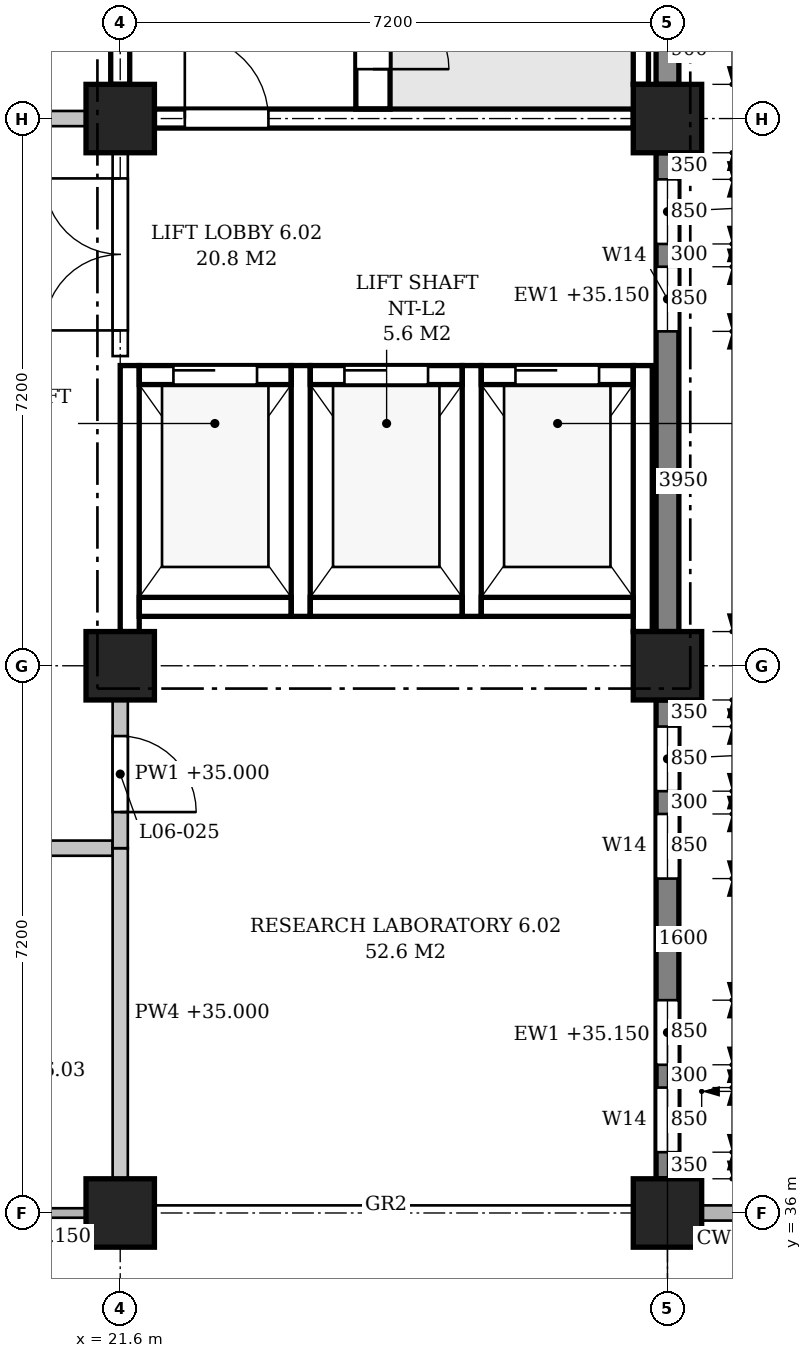
"""IFC4 building model, lengths in metres.
Left out: names, types, materials, properties, quantities, classifications, styles, units other than length and angle.
Written with IfcOpenShell. Run it as: python <this file> out.ifc"""

import sys

from ifc_helpers import new_model, si_unit, direction, frame, frame_2d, origin, origin_2d, place, context, subcontext, project, spatial, polyline, rectangle, outline, extrude, element, fill, save


model = new_model("IFC4")
c1 = context("Model", 3, precision=1e-05, world=origin(), true_north=direction((0.0, 1.0)))
c2 = subcontext(c1, "Body", "Model", "MODEL_VIEW")
j1 = project(units=[si_unit("LENGTHUNIT", "METRE"), si_unit("PLANEANGLEUNIT", "RADIAN")], contexts=[c1])
p1 = place(None, origin())
s1 = spatial("IfcSite", under=j1, at=p1, CompositionType="ELEMENT")
p2 = place(p1, origin())
s2 = spatial("IfcBuilding", under=s1, at=p2, CompositionType="ELEMENT")
p3 = place(p2, frame((0.0, 0.0, 31.2)))
s3 = spatial("IfcBuildingStorey", under=s2, at=p3, CompositionType="ELEMENT", Elevation=31.2)
for number, where, z_axis, x_axis in (
    (1, (21.6, 36.0, 0.0), (0.0, 0.0, 1.0), (1.0, 0.0, 0.0)),
    (2, (21.6, 43.2, 0.0), (0.0, 0.0, 1.0), (1.0, 0.0, 0.0)),
    (3, (21.6, 50.4, 0.0), (0.0, 0.0, 1.0), (1.0, 0.0, 0.0)),
    (4, (28.8, 36.0, 0.0), (0.0, 0.0, 1.0), (1.0, 0.0, 0.0)),
    (5, (28.8, 43.2, 0.0), (0.0, 0.0, 1.0), (1.0, 0.0, 0.0)),
    (6, (28.8, 50.4, 0.0), (0.0, 0.0, 1.0), (1.0, 0.0, 0.0)),
):
    element("IfcColumn", number, at=place(p3, frame(where, z_axis=z_axis, x_axis=x_axis)), inside=s3, PredefinedType="COLUMN", context=c2, shape_type="SweptSolid", body=[
        extrude(rectangle(XDim=0.9, YDim=0.9, at=origin_2d()), origin(), (0.0, 0.0, 1.0), 4.8),
    ])
p4 = place(p3, frame((28.8, 36.45, 0.0), z_axis=(0.0, 0.0, 1.0), x_axis=(0.0, 1.0, 0.0)))
e7 = element("IfcWall", 7, at=p4, inside=s3, PredefinedType="STANDARD", context=c2, shape_type="SweptSolid", body=[
    extrude(rectangle(XDim=6.3, YDim=0.3, at=frame_2d((3.15, 0.0))), origin(), (0.0, 0.0, 1.0), 3.95),
])
p5 = place(p4, frame((0.35, 0.0, 0.9)))
e8 = element("IfcOpeningElement", 8, at=p5, cuts=e7, PredefinedType="OPENING", context=c2, shape_type="SweptSolid", body=[
    extrude(outline(polyline([(0.0, 0.0), (0.85, 0.0), (0.85, 2.05), (0.425, 2.5), (0.0, 2.05), (0.0, 0.0)])), frame((0.0, 0.16, 0.0), z_axis=(0.0, -1.0, 0.0), x_axis=(1.0, 0.0, 0.0)), (0.0, 0.0, 1.0), 0.32),
])
p6 = place(p4, frame((1.5, 0.0, 0.9)))
e9 = element("IfcOpeningElement", 9, at=p6, cuts=e7, PredefinedType="OPENING", context=c2, shape_type="SweptSolid", body=[
    extrude(outline(polyline([(0.0, 0.0), (0.85, 0.0), (0.85, 2.05), (0.425, 2.5), (0.0, 2.05), (0.0, 0.0)])), frame((0.0, 0.16, 0.0), z_axis=(0.0, -1.0, 0.0), x_axis=(1.0, 0.0, 0.0)), (0.0, 0.0, 1.0), 0.32),
])
p7 = place(p4, frame((3.95, 0.0, 0.9)))
e10 = element("IfcOpeningElement", 10, at=p7, cuts=e7, PredefinedType="OPENING", context=c2, shape_type="SweptSolid", body=[
    extrude(outline(polyline([(0.0, 0.0), (0.85, 0.0), (0.85, 2.05), (0.425, 2.5), (0.0, 2.05), (0.0, 0.0)])), frame((0.0, 0.16, 0.0), z_axis=(0.0, -1.0, 0.0), x_axis=(1.0, 0.0, 0.0)), (0.0, 0.0, 1.0), 0.32),
])
p8 = place(p4, frame((5.1, 0.0, 0.9)))
e11 = element("IfcOpeningElement", 11, at=p8, cuts=e7, PredefinedType="OPENING", context=c2, shape_type="SweptSolid", body=[
    extrude(outline(polyline([(0.0, 0.0), (0.85, 0.0), (0.85, 2.05), (0.425, 2.5), (0.0, 2.05), (0.0, 0.0)])), frame((0.0, 0.16, 0.0), z_axis=(0.0, -1.0, 0.0), x_axis=(1.0, 0.0, 0.0)), (0.0, 0.0, 1.0), 0.32),
])
p9 = place(p3, frame((28.8, 43.65, 0.0), z_axis=(0.0, 0.0, 1.0), x_axis=(0.0, 1.0, 0.0)))
e12 = element("IfcWall", 12, at=p9, inside=s3, PredefinedType="STANDARD", context=c2, shape_type="SweptSolid", body=[
    extrude(rectangle(XDim=6.3, YDim=0.3, at=frame_2d((3.15, 0.0))), origin(), (0.0, 0.0, 1.0), 3.95),
])
p10 = place(p9, frame((3.95, 0.0, 0.9)))
e13 = element("IfcOpeningElement", 13, at=p10, cuts=e12, PredefinedType="OPENING", context=c2, shape_type="SweptSolid", body=[
    extrude(outline(polyline([(0.0, 0.0), (0.85, 0.0), (0.85, 2.05), (0.425, 2.5), (0.0, 2.05), (0.0, 0.0)])), frame((0.0, 0.16, 0.0), z_axis=(0.0, -1.0, 0.0), x_axis=(1.0, 0.0, 0.0)), (0.0, 0.0, 1.0), 0.32),
])
p11 = place(p9, frame((5.1, 0.0, 0.9)))
e14 = element("IfcOpeningElement", 14, at=p11, cuts=e12, PredefinedType="OPENING", context=c2, shape_type="SweptSolid", body=[
    extrude(outline(polyline([(0.0, 0.0), (0.85, 0.0), (0.85, 2.05), (0.425, 2.5), (0.0, 2.05), (0.0, 0.0)])), frame((0.0, 0.16, 0.0), z_axis=(0.0, -1.0, 0.0), x_axis=(1.0, 0.0, 0.0)), (0.0, 0.0, 1.0), 0.32),
])
p12 = place(p3, frame((28.8, 50.85, 0.0), z_axis=(0.0, 0.0, 1.0), x_axis=(0.0, 1.0, 0.0)))
e15 = element("IfcWall", 15, at=p12, inside=s3, PredefinedType="STANDARD", context=c2, shape_type="SweptSolid", body=[
    extrude(rectangle(XDim=6.3, YDim=0.3, at=frame_2d((3.15, 0.0))), origin(), (0.0, 0.0, 1.0), 3.95),
])
p13 = place(p12, frame((0.9, 0.0, 0.9)))
e16 = element("IfcOpeningElement", 16, at=p13, cuts=e15, PredefinedType="OPENING", context=c2, shape_type="SweptSolid", body=[
    extrude(outline(polyline([(0.0, 0.0), (0.9, 0.0), (0.9, 2.05), (0.45, 2.5), (0.0, 2.05), (0.0, 0.0)])), frame((0.0, 0.16, 0.0), z_axis=(0.0, -1.0, 0.0), x_axis=(1.0, 0.0, 0.0)), (0.0, 0.0, 1.0), 0.32),
])
p14 = place(p12, frame((4.5, 0.0, 0.9)))
e17 = element("IfcOpeningElement", 17, at=p14, cuts=e15, PredefinedType="OPENING", context=c2, shape_type="SweptSolid", body=[
    extrude(outline(polyline([(0.0, 0.0), (0.9, 0.0), (0.9, 2.05), (0.45, 2.5), (0.0, 2.05), (0.0, 0.0)])), frame((0.0, 0.16, 0.0), z_axis=(0.0, -1.0, 0.0), x_axis=(1.0, 0.0, 0.0)), (0.0, 0.0, 1.0), 0.32),
])
p15 = place(p3, frame((22.05, 50.4, 0.0), z_axis=(0.0, 0.0, 1.0), x_axis=(1.0, 0.0, 0.0)))
e18 = element("IfcWall", 18, at=p15, inside=s3, PredefinedType="SHEAR", context=c2, shape_type="SweptSolid", body=[
    extrude(rectangle(XDim=6.3, YDim=0.25, at=frame_2d((3.15, 0.0))), origin(), (0.0, 0.0, 1.0), 3.8),
])
p16 = place(p15, frame((0.4, 0.0, 0.0)))
e19 = element("IfcOpeningElement", 19, at=p16, cuts=e18, PredefinedType="OPENING", context=c2, shape_type="SweptSolid", body=[
    extrude(rectangle(XDim=1.1, YDim=2.1, at=frame_2d((0.55, 1.05))), frame((0.0, 0.135, 0.0), z_axis=(0.0, -1.0, 0.0), x_axis=(1.0, 0.0, 0.0)), (0.0, 0.0, 1.0), 0.27),
])
p17 = place(p3, frame((21.6, 50.85, 0.0), z_axis=(0.0, 0.0, 1.0), x_axis=(0.0, 1.0, 0.0)))
e20 = element("IfcWall", 20, at=p17, inside=s3, PredefinedType="SHEAR", context=c2, shape_type="SweptSolid", body=[
    extrude(rectangle(XDim=6.3, YDim=0.25, at=frame_2d((3.15, 0.0))), origin(), (0.0, 0.0, 1.0), 3.8),
])
p18 = place(p3, frame((28.45, 50.85, -0.25), z_axis=(0.0, 0.0, 1.0), x_axis=(0.0, 1.0, 0.0)))
e21 = element("IfcWall", 21, at=p18, inside=s3, PredefinedType="SHEAR", context=c2, shape_type="SweptSolid", body=[
    extrude(rectangle(XDim=0.9, YDim=0.2, at=frame_2d((0.45, 0.0))), origin(), (0.0, 0.0, 1.0), 4.8),
])
p19 = place(p3, frame((24.925, 50.525, 0.0), z_axis=(0.0, 0.0, 1.0), x_axis=(0.0, 1.0, 0.0)))
e22 = element("IfcWall", 22, at=p19, inside=s3, PredefinedType="SHEAR", context=c2, shape_type="SweptSolid", body=[
    extrude(rectangle(XDim=6.85, YDim=0.45, at=frame_2d((3.425, 0.0))), origin(), (0.0, 0.0, 1.0), 4.55),
])
p20 = place(p19, frame((0.525, 0.0, 0.0)))
e23 = element("IfcOpeningElement", 23, at=p20, cuts=e22, PredefinedType="OPENING", context=c2, shape_type="SweptSolid", body=[
    extrude(rectangle(XDim=1.0, YDim=2.1, at=frame_2d((0.5, 1.05))), frame((0.0, 0.235, 0.0), z_axis=(0.0, -1.0, 0.0), x_axis=(1.0, 0.0, 0.0)), (0.0, 0.0, 1.0), 0.47),
])
p21 = place(p3, frame((21.725, 43.65, -0.25), z_axis=(0.0, 0.0, 1.0), x_axis=(0.0, 1.0, 0.0)))
e24 = element("IfcWall", 24, at=p21, inside=s3, PredefinedType="SHEAR", context=c2, shape_type="SweptSolid", body=[
    extrude(rectangle(XDim=3.5, YDim=0.25, at=frame_2d((1.75, 0.0))), origin(), (0.0, 0.0, 1.0), 4.05),
])
for number, where, z_axis, x_axis in (
    (25, (23.975, 43.85, -0.25), (0.0, 0.0, 1.0), (0.0, 1.0, 0.0)),
    (26, (26.225, 43.85, -0.25), (0.0, 0.0, 1.0), (0.0, 1.0, 0.0)),
):
    element("IfcWall", number, at=place(p3, frame(where, z_axis=z_axis, x_axis=x_axis)), inside=s3, PredefinedType="SHEAR", context=c2, shape_type="SweptSolid", body=[
        extrude(rectangle(XDim=3.3, YDim=0.25, at=frame_2d((1.65, 0.0))), origin(), (0.0, 0.0, 1.0), 4.8),
    ])
p22 = place(p3, frame((28.475, 43.65, -0.25), z_axis=(0.0, 0.0, 1.0), x_axis=(0.0, 1.0, 0.0)))
e27 = element("IfcWall", 27, at=p22, inside=s3, PredefinedType="SHEAR", context=c2, shape_type="SweptSolid", body=[
    extrude(rectangle(XDim=3.5, YDim=0.25, at=frame_2d((1.75, 0.0))), origin(), (0.0, 0.0, 1.0), 4.8),
])
p23 = place(p3, frame((21.85, 47.025, -0.25), z_axis=(0.0, 0.0, 1.0), x_axis=(1.0, 0.0, 0.0)))
e28 = element("IfcWall", 28, at=p23, inside=s3, PredefinedType="SHEAR", context=c2, shape_type="SweptSolid", body=[
    extrude(rectangle(XDim=2.0, YDim=0.25, at=frame_2d((1.0, 0.0))), origin(), (0.0, 0.0, 1.0), 4.8),
])
p24 = place(p23, frame((0.45, 0.0, 0.25)))
e29 = element("IfcOpeningElement", 29, at=p24, cuts=e28, PredefinedType="OPENING", context=c2, shape_type="SweptSolid", body=[
    extrude(rectangle(XDim=1.1, YDim=2.1, at=frame_2d((0.55, 1.05))), frame((0.0, 0.135, 0.0), z_axis=(0.0, -1.0, 0.0), x_axis=(1.0, 0.0, 0.0)), (0.0, 0.0, 1.0), 0.27),
])
p25 = place(p3, frame((21.85, 43.975, -0.25), z_axis=(0.0, 0.0, 1.0), x_axis=(1.0, 0.0, 0.0)))
e30 = element("IfcWall", 30, at=p25, inside=s3, PredefinedType="SHEAR", context=c2, shape_type="SweptSolid", body=[
    extrude(rectangle(XDim=2.0, YDim=0.25, at=frame_2d((1.0, 0.0))), origin(), (0.0, 0.0, 1.0), 4.8),
])
p26 = place(p3, frame((24.1, 47.025, -0.25), z_axis=(0.0, 0.0, 1.0), x_axis=(1.0, 0.0, 0.0)))
e31 = element("IfcWall", 31, at=p26, inside=s3, PredefinedType="SHEAR", context=c2, shape_type="SweptSolid", body=[
    extrude(rectangle(XDim=2.0, YDim=0.25, at=frame_2d((1.0, 0.0))), origin(), (0.0, 0.0, 1.0), 4.8),
])
p27 = place(p26, frame((0.45, 0.0, 0.25)))
e32 = element("IfcOpeningElement", 32, at=p27, cuts=e31, PredefinedType="OPENING", context=c2, shape_type="SweptSolid", body=[
    extrude(rectangle(XDim=1.1, YDim=2.1, at=frame_2d((0.55, 1.05))), frame((0.0, 0.135, 0.0), z_axis=(0.0, -1.0, 0.0), x_axis=(1.0, 0.0, 0.0)), (0.0, 0.0, 1.0), 0.27),
])
p28 = place(p3, frame((24.1, 43.975, -0.25), z_axis=(0.0, 0.0, 1.0), x_axis=(1.0, 0.0, 0.0)))
e33 = element("IfcWall", 33, at=p28, inside=s3, PredefinedType="SHEAR", context=c2, shape_type="SweptSolid", body=[
    extrude(rectangle(XDim=2.0, YDim=0.25, at=frame_2d((1.0, 0.0))), origin(), (0.0, 0.0, 1.0), 4.8),
])
p29 = place(p3, frame((26.35, 47.025, -0.25), z_axis=(0.0, 0.0, 1.0), x_axis=(1.0, 0.0, 0.0)))
e34 = element("IfcWall", 34, at=p29, inside=s3, PredefinedType="SHEAR", context=c2, shape_type="SweptSolid", body=[
    extrude(rectangle(XDim=2.0, YDim=0.25, at=frame_2d((1.0, 0.0))), origin(), (0.0, 0.0, 1.0), 4.8),
])
p30 = place(p29, frame((0.45, 0.0, 0.25)))
e35 = element("IfcOpeningElement", 35, at=p30, cuts=e34, PredefinedType="OPENING", context=c2, shape_type="SweptSolid", body=[
    extrude(rectangle(XDim=1.1, YDim=2.1, at=frame_2d((0.55, 1.05))), frame((0.0, 0.135, 0.0), z_axis=(0.0, -1.0, 0.0), x_axis=(1.0, 0.0, 0.0)), (0.0, 0.0, 1.0), 0.27),
])
p31 = place(p3, frame((26.35, 43.975, -0.25), z_axis=(0.0, 0.0, 1.0), x_axis=(1.0, 0.0, 0.0)))
e36 = element("IfcWall", 36, at=p31, inside=s3, PredefinedType="SHEAR", context=c2, shape_type="SweptSolid", body=[
    extrude(rectangle(XDim=2.0, YDim=0.25, at=frame_2d((1.0, 0.0))), origin(), (0.0, 0.0, 1.0), 4.8),
])
p32 = place(p3, frame((18.1, 40.8, 0.0), z_axis=(0.0, 0.0, 1.0), x_axis=(1.0, 0.0, 0.0)))
e37 = element("IfcWall", 37, at=p32, inside=s3, PredefinedType="PARTITIONING", context=c2, shape_type="SweptSolid", body=[
    extrude(outline(polyline([(0.0, 0.0), (3.4, 0.0), (3.4, 3.8), (3.25, 3.8), (3.25, 4.55), (0.0, 4.55), (0.0, 0.0)])), frame((0.0, 0.1, 0.0), z_axis=(0.0, -1.0, 0.0), x_axis=(1.0, 0.0, 0.0)), (0.0, 0.0, 1.0), 0.2),
])
p33 = place(p32, frame((1.2, 0.0, 0.0)))
e38 = element("IfcOpeningElement", 38, at=p33, cuts=e37, PredefinedType="OPENING", context=c2, shape_type="SweptSolid", body=[
    extrude(rectangle(XDim=1.0, YDim=2.1, at=frame_2d((0.5, 1.05))), frame((0.0, 0.11, 0.0), z_axis=(0.0, -1.0, 0.0), x_axis=(1.0, 0.0, 0.0)), (0.0, 0.0, 1.0), 0.22),
])
p34 = place(p3, frame((14.85, 50.4, 0.0), z_axis=(0.0, 0.0, 1.0), x_axis=(1.0, 0.0, 0.0)))
e39 = element("IfcWall", 39, at=p34, inside=s3, PredefinedType="PARTITIONING", context=c2, shape_type="SweptSolid", body=[
    extrude(rectangle(XDim=6.3, YDim=0.2, at=frame_2d((3.15, 0.0))), origin(), (0.0, 0.0, 1.0), 3.8),
])
p35 = place(p34, frame((4.225, 0.0, 0.0)))
e40 = element("IfcOpeningElement", 40, at=p35, cuts=e39, PredefinedType="OPENING", context=c2, shape_type="SweptSolid", body=[
    extrude(rectangle(XDim=1.0, YDim=2.1, at=frame_2d((0.5, 1.05))), frame((0.0, 0.11, 0.0), z_axis=(0.0, -1.0, 0.0), x_axis=(1.0, 0.0, 0.0)), (0.0, 0.0, 1.0), 0.22),
])
p36 = place(p3, frame((21.6, 36.45, 0.0), z_axis=(0.0, 0.0, 1.0), x_axis=(0.0, 1.0, 0.0)))
e41 = element("IfcWall", 41, at=p36, inside=s3, PredefinedType="PARTITIONING", context=c2, shape_type="SweptSolid", body=[
    extrude(rectangle(XDim=4.35, YDim=0.2, at=frame_2d((2.175, 0.0))), origin(), (0.0, 0.0, 1.0), 3.8),
])
p37 = place(p3, frame((21.6, 40.8, 0.0), z_axis=(0.0, 0.0, 1.0), x_axis=(0.0, 1.0, 0.0)))
e42 = element("IfcWall", 42, at=p37, inside=s3, PredefinedType="PARTITIONING", context=c2, shape_type="SweptSolid", body=[
    extrude(rectangle(XDim=1.95, YDim=0.2, at=frame_2d((0.975, 0.0))), origin(), (0.0, 0.0, 1.0), 3.8),
])
p38 = place(p37, frame((0.475, 0.0, 0.0)))
e43 = element("IfcOpeningElement", 43, at=p38, cuts=e42, PredefinedType="OPENING", context=c2, shape_type="SweptSolid", body=[
    extrude(rectangle(XDim=1.0, YDim=2.1, at=frame_2d((0.5, 1.05))), frame((0.0, 0.11, 0.0), z_axis=(0.0, -1.0, 0.0), x_axis=(1.0, 0.0, 0.0)), (0.0, 0.0, 1.0), 0.22),
])
p39 = place(p3, frame((21.6, 47.275, 0.0), z_axis=(0.0, 0.0, 1.0), x_axis=(0.0, 1.0, 0.0)))
e44 = element("IfcWall", 44, at=p39, inside=s3, PredefinedType="PARTITIONING", context=c2, shape_type="SweptSolid", body=[
    extrude(rectangle(XDim=2.675, YDim=0.2, at=frame_2d((1.337, 0.0))), origin(), (0.0, 0.0, 1.0), 3.8),
])
p40 = place(p39, frame((0.337, 0.0, 0.0)))
e45 = element("IfcOpeningElement", 45, at=p40, cuts=e44, PredefinedType="OPENING", context=c2, shape_type="SweptSolid", body=[
    extrude(rectangle(XDim=2.0, YDim=2.4, at=frame_2d((1.0, 1.2))), frame((0.0, 0.11, 0.0), z_axis=(0.0, -1.0, 0.0), x_axis=(1.0, 0.0, 0.0)), (0.0, 0.0, 1.0), 0.22),
])
p41 = place(p5, origin())
e46 = element("IfcWindow", 46, at=p41, inside=s3, PartitioningType="SINGLE_PANEL", PredefinedType="WINDOW", context=c2, shape_type="SweptSolid", body=[
    extrude(outline(polyline([(0.0, 0.0), (0.85, 0.0), (0.85, 2.05), (0.425, 2.5), (0.0, 2.05), (0.0, 0.0)])), frame((0.0, 0.03, 0.0), z_axis=(0.0, -1.0, 0.0), x_axis=(1.0, 0.0, 0.0)), (0.0, 0.0, 1.0), 0.06),
])
fill(e8, e46)
p42 = place(p6, origin())
e47 = element("IfcWindow", 47, at=p42, inside=s3, PartitioningType="SINGLE_PANEL", PredefinedType="WINDOW", context=c2, shape_type="SweptSolid", body=[
    extrude(outline(polyline([(0.0, 0.0), (0.85, 0.0), (0.85, 2.05), (0.425, 2.5), (0.0, 2.05), (0.0, 0.0)])), frame((0.0, 0.03, 0.0), z_axis=(0.0, -1.0, 0.0), x_axis=(1.0, 0.0, 0.0)), (0.0, 0.0, 1.0), 0.06),
])
fill(e9, e47)
p43 = place(p7, origin())
e48 = element("IfcWindow", 48, at=p43, inside=s3, PartitioningType="SINGLE_PANEL", PredefinedType="WINDOW", context=c2, shape_type="SweptSolid", body=[
    extrude(outline(polyline([(0.0, 0.0), (0.85, 0.0), (0.85, 2.05), (0.425, 2.5), (0.0, 2.05), (0.0, 0.0)])), frame((0.0, 0.03, 0.0), z_axis=(0.0, -1.0, 0.0), x_axis=(1.0, 0.0, 0.0)), (0.0, 0.0, 1.0), 0.06),
])
fill(e10, e48)
p44 = place(p8, origin())
e49 = element("IfcWindow", 49, at=p44, inside=s3, PartitioningType="SINGLE_PANEL", PredefinedType="WINDOW", context=c2, shape_type="SweptSolid", body=[
    extrude(outline(polyline([(0.0, 0.0), (0.85, 0.0), (0.85, 2.05), (0.425, 2.5), (0.0, 2.05), (0.0, 0.0)])), frame((0.0, 0.03, 0.0), z_axis=(0.0, -1.0, 0.0), x_axis=(1.0, 0.0, 0.0)), (0.0, 0.0, 1.0), 0.06),
])
fill(e11, e49)
p45 = place(p10, origin())
e50 = element("IfcWindow", 50, at=p45, inside=s3, PartitioningType="SINGLE_PANEL", PredefinedType="WINDOW", context=c2, shape_type="SweptSolid", body=[
    extrude(outline(polyline([(0.0, 0.0), (0.85, 0.0), (0.85, 2.05), (0.425, 2.5), (0.0, 2.05), (0.0, 0.0)])), frame((0.0, 0.03, 0.0), z_axis=(0.0, -1.0, 0.0), x_axis=(1.0, 0.0, 0.0)), (0.0, 0.0, 1.0), 0.06),
])
fill(e13, e50)
p46 = place(p11, origin())
e51 = element("IfcWindow", 51, at=p46, inside=s3, PartitioningType="SINGLE_PANEL", PredefinedType="WINDOW", context=c2, shape_type="SweptSolid", body=[
    extrude(outline(polyline([(0.0, 0.0), (0.85, 0.0), (0.85, 2.05), (0.425, 2.5), (0.0, 2.05), (0.0, 0.0)])), frame((0.0, 0.03, 0.0), z_axis=(0.0, -1.0, 0.0), x_axis=(1.0, 0.0, 0.0)), (0.0, 0.0, 1.0), 0.06),
])
fill(e14, e51)
p47 = place(p20, frame((1.0, 0.0, 0.0), z_axis=(0.0, 0.0, 1.0), x_axis=(-1.0, 0.0, 0.0)))
e52 = element("IfcDoor", 52, at=p47, inside=s3, OperationType="SINGLE_SWING_RIGHT", PredefinedType="DOOR", context=c2, shape_type="SweptSolid", body=[
    extrude(rectangle(XDim=1.0, YDim=2.1, at=frame_2d((0.5, 1.05))), frame((0.0, 0.025, 0.0), z_axis=(0.0, -1.0, 0.0), x_axis=(1.0, 0.0, 0.0)), (0.0, 0.0, 1.0), 0.05),
])
fill(e23, e52)
p48 = place(p16, origin())
e53 = element("IfcDoor", 53, at=p48, inside=s3, OperationType="SINGLE_SWING_LEFT", PredefinedType="DOOR", context=c2, shape_type="SweptSolid", body=[
    extrude(rectangle(XDim=1.1, YDim=2.1, at=frame_2d((0.55, 1.05))), frame((0.0, 0.025, 0.0), z_axis=(0.0, -1.0, 0.0), x_axis=(1.0, 0.0, 0.0)), (0.0, 0.0, 1.0), 0.05),
])
fill(e19, e53)
p49 = place(p24, origin())
e54 = element("IfcDoor", 54, at=p49, inside=s3, OperationType="SLIDING_TO_LEFT", PredefinedType="DOOR", context=c2, shape_type="SweptSolid", body=[
    extrude(rectangle(XDim=1.1, YDim=2.1, at=frame_2d((0.55, 1.05))), frame((0.0, 0.025, 0.0), z_axis=(0.0, -1.0, 0.0), x_axis=(1.0, 0.0, 0.0)), (0.0, 0.0, 1.0), 0.05),
])
fill(e29, e54)
p50 = place(p27, origin())
e55 = element("IfcDoor", 55, at=p50, inside=s3, OperationType="SLIDING_TO_LEFT", PredefinedType="DOOR", context=c2, shape_type="SweptSolid", body=[
    extrude(rectangle(XDim=1.1, YDim=2.1, at=frame_2d((0.55, 1.05))), frame((0.0, 0.025, 0.0), z_axis=(0.0, -1.0, 0.0), x_axis=(1.0, 0.0, 0.0)), (0.0, 0.0, 1.0), 0.05),
])
fill(e32, e55)
p51 = place(p30, origin())
e56 = element("IfcDoor", 56, at=p51, inside=s3, OperationType="SLIDING_TO_LEFT", PredefinedType="DOOR", context=c2, shape_type="SweptSolid", body=[
    extrude(rectangle(XDim=1.1, YDim=2.1, at=frame_2d((0.55, 1.05))), frame((0.0, 0.025, 0.0), z_axis=(0.0, -1.0, 0.0), x_axis=(1.0, 0.0, 0.0)), (0.0, 0.0, 1.0), 0.05),
])
fill(e35, e56)
p52 = place(p40, origin())
e57 = element("IfcDoor", 57, at=p52, inside=s3, OperationType="DOUBLE_DOOR_SINGLE_SWING", PredefinedType="DOOR", context=c2, shape_type="SweptSolid", body=[
    extrude(rectangle(XDim=2.0, YDim=2.4, at=frame_2d((1.0, 1.2))), frame((0.0, 0.025, 0.0), z_axis=(0.0, -1.0, 0.0), x_axis=(1.0, 0.0, 0.0)), (0.0, 0.0, 1.0), 0.05),
])
fill(e45, e57)
p53 = place(p38, frame((1.0, 0.0, 0.0), z_axis=(0.0, 0.0, 1.0), x_axis=(-1.0, 0.0, 0.0)))
e58 = element("IfcDoor", 58, at=p53, inside=s3, OperationType="SINGLE_SWING_RIGHT", PredefinedType="DOOR", context=c2, shape_type="SweptSolid", body=[
    extrude(rectangle(XDim=1.0, YDim=2.1, at=frame_2d((0.5, 1.05))), frame((0.0, 0.025, 0.0), z_axis=(0.0, -1.0, 0.0), x_axis=(1.0, 0.0, 0.0)), (0.0, 0.0, 1.0), 0.05),
])
fill(e43, e58)
save(model, sys.argv[1])
